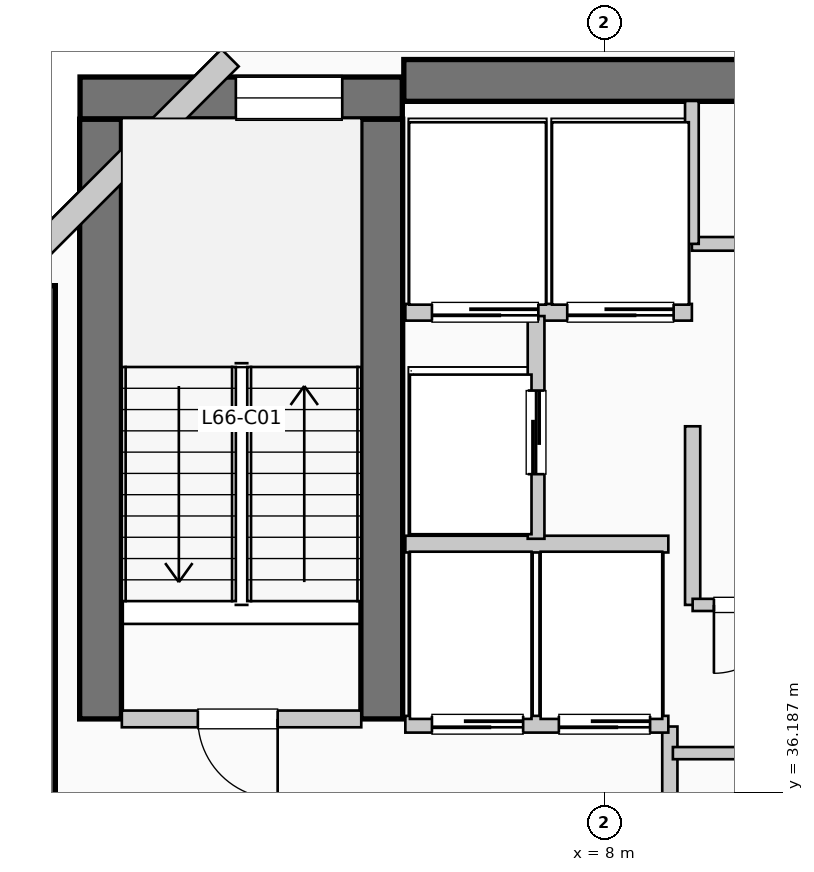
"""IFC4 building model, lengths in metres.
Left out: names, types, materials, properties, quantities, classifications, styles, units other than length and angle.
Written with IfcOpenShell. Run it as: python <this file> out.ifc"""

import sys

from ifc_helpers import new_model, si_unit, direction, frame, frame_2d, origin, place, context, subcontext, project, spatial, rectangle, extrude, element, fill, save


model = new_model("IFC4")
c1 = context("Model", 3, precision=1e-05, world=origin(), true_north=direction((0.0, 1.0)))
c2 = subcontext(c1, "Body", "Model", "MODEL_VIEW")
j1 = project(units=[si_unit("LENGTHUNIT", "METRE"), si_unit("PLANEANGLEUNIT", "RADIAN")], contexts=[c1])
p1 = place(None, origin())
s1 = spatial("IfcSite", under=j1, at=p1, CompositionType="ELEMENT")
p2 = place(p1, origin())
s2 = spatial("IfcBuilding", under=s1, at=p2, CompositionType="ELEMENT")
p3 = place(p2, frame((0.0, 0.0, 272.25)))
s3 = spatial("IfcBuildingStorey", under=s2, at=p3, CompositionType="ELEMENT", Elevation=272.25)
p4 = place(p3, frame((5.36, 45.55, 0.0), z_axis=(0.0, 0.0, 1.0), x_axis=(1.0, 0.0, 0.0)))
e1 = element("IfcWall", 1, at=p4, inside=s3, PredefinedType="SHEAR", context=c2, shape_type="SweptSolid", body=[
    extrude(rectangle(XDim=13.98, YDim=0.55, at=frame_2d((6.99, 0.0))), origin(), (0.0, 0.0, 1.0), 3.96),
])
p5 = place(p3, frame((0.5, 34.95, 0.0), z_axis=(0.0, 0.0, 1.0), x_axis=(0.0, 1.0, 0.0)))
e2 = element("IfcWall", 2, at=p5, inside=s3, PredefinedType="SHEAR", context=c2, shape_type="SweptSolid", body=[
    extrude(rectangle(XDim=7.9, YDim=0.55, at=frame_2d((3.95, 0.0))), origin(), (0.0, 0.0, 1.0), 3.96),
])
for number, where, z_axis, x_axis in (
    (3, (1.37, 37.15, 0.0), (0.0, 0.0, 1.0), (0.0, 1.0, 0.0)),
    (4, (5.07, 37.15, 0.0), (0.0, 0.0, 1.0), (0.0, 1.0, 0.0)),
):
    element("IfcWall", number, at=place(p3, frame(where, z_axis=z_axis, x_axis=x_axis)), inside=s3, PredefinedType="SHEAR", context=c2, shape_type="SweptSolid", body=[
        extrude(rectangle(XDim=7.89, YDim=0.55, at=frame_2d((3.945, 0.0))), origin(), (0.0, 0.0, 1.0), 3.96),
    ])
p6 = place(p3, frame((1.1, 45.32, 0.0), z_axis=(0.0, 0.0, 1.0), x_axis=(1.0, 0.0, 0.0)))
e5 = element("IfcWall", 5, at=p6, inside=s3, PredefinedType="SHEAR", context=c2, shape_type="SweptSolid", body=[
    extrude(rectangle(XDim=4.24, YDim=0.55, at=frame_2d((2.12, 0.0))), origin(), (0.0, 0.0, 1.0), 3.96),
])
p7 = place(p6, frame((2.05, 0.0, 1.05)))
e6 = element("IfcOpeningElement", 6, at=p7, cuts=e5, PredefinedType="OPENING", context=c2, shape_type="SweptSolid", body=[
    extrude(rectangle(XDim=1.4, YDim=1.8, at=frame_2d((0.7, 0.9))), frame((0.0, 0.285, 0.0), z_axis=(0.0, -1.0, 0.0), x_axis=(1.0, 0.0, 0.0)), (0.0, 0.0, 1.0), 0.57),
])
p8 = place(p3, frame((3.074, 45.848, 0.0), z_axis=(0.0, 0.0, 1.0), x_axis=(-0.707106781187, -0.707106781187, 0.0)))
e7 = element("IfcWall", 7, at=p8, inside=s3, PredefinedType="SOLIDWALL", context=c2, shape_type="SweptSolid", body=[
    extrude(rectangle(XDim=4.133, YDim=0.32, at=frame_2d((2.066, 0.0))), origin(), (0.0, 0.0, 1.0), 3.74),
])
p9 = place(p3, frame((1.65, 37.15, 0.0), z_axis=(0.0, 0.0, 1.0), x_axis=(1.0, 0.0, 0.0)))
e8 = element("IfcWall", 8, at=p9, inside=s3, PredefinedType="PARTITIONING", context=c2, shape_type="SweptSolid", body=[
    extrude(rectangle(XDim=3.15, YDim=0.22, at=frame_2d((1.575, 0.0))), origin(), (0.0, 0.0, 1.0), 3.74),
])
p10 = place(p9, frame((2.05, 0.0, 0.0), z_axis=(0.0, 0.0, 1.0), x_axis=(-1.0, 0.0, 0.0)))
e9 = element("IfcOpeningElement", 9, at=p10, cuts=e8, PredefinedType="OPENING", context=c2, shape_type="SweptSolid", body=[
    extrude(rectangle(XDim=1.05, YDim=2.15, at=frame_2d((0.525, 1.075))), frame((0.0, 0.12, 0.0), z_axis=(0.0, -1.0, 0.0), x_axis=(1.0, 0.0, 0.0)), (0.0, 0.0, 1.0), 0.24),
])
p11 = place(p3, frame((8.86, 34.55, 0.0), z_axis=(0.0, 0.0, 1.0), x_axis=(0.0, 1.0, 0.0)))
e10 = element("IfcWall", 10, at=p11, inside=s3, PredefinedType="PARTITIONING", context=c2, shape_type="SweptSolid", body=[
    extrude(rectangle(XDim=2.5, YDim=0.2, at=frame_2d((1.25, 0.0))), origin(), (0.0, 0.0, 1.0), 3.74),
])
p12 = place(p3, frame((5.38, 37.08, 0.0), z_axis=(0.0, 0.0, 1.0), x_axis=(1.0, 0.0, 0.0)))
e11 = element("IfcWall", 11, at=p12, inside=s3, PredefinedType="PARTITIONING", context=c2, shape_type="SweptSolid", body=[
    extrude(rectangle(XDim=3.46, YDim=0.22, at=frame_2d((1.73, 0.0))), origin(), (0.0, 0.0, 1.0), 3.74),
])
p13 = place(p12, frame((1.55, 0.0, 0.0), z_axis=(0.0, 0.0, 1.0), x_axis=(-1.0, 0.0, 0.0)))
e12 = element("IfcOpeningElement", 12, at=p13, cuts=e11, PredefinedType="OPENING", context=c2, shape_type="SweptSolid", body=[
    extrude(rectangle(XDim=1.2, YDim=2.2, at=frame_2d((0.6, 1.1))), frame((0.0, 0.12, 0.0), z_axis=(0.0, -1.0, 0.0), x_axis=(1.0, 0.0, 0.0)), (0.0, 0.0, 1.0), 0.24),
])
p14 = place(p12, frame((3.22, 0.0, 0.0), z_axis=(0.0, 0.0, 1.0), x_axis=(-1.0, 0.0, 0.0)))
e13 = element("IfcOpeningElement", 13, at=p14, cuts=e11, PredefinedType="OPENING", context=c2, shape_type="SweptSolid", body=[
    extrude(rectangle(XDim=1.2, YDim=2.2, at=frame_2d((0.6, 1.1))), frame((0.0, 0.12, 0.0), z_axis=(0.0, -1.0, 0.0), x_axis=(1.0, 0.0, 0.0)), (0.0, 0.0, 1.0), 0.24),
])
p15 = place(p3, frame((5.38, 39.45, 0.0), z_axis=(0.0, 0.0, 1.0), x_axis=(1.0, 0.0, 0.0)))
e14 = element("IfcWall", 14, at=p15, inside=s3, PredefinedType="PARTITIONING", context=c2, shape_type="SweptSolid", body=[
    extrude(rectangle(XDim=3.46, YDim=0.22, at=frame_2d((1.73, 0.0))), origin(), (0.0, 0.0, 1.0), 3.74),
])
p16 = place(p3, frame((5.38, 42.5, 0.0), z_axis=(0.0, 0.0, 1.0), x_axis=(1.0, 0.0, 0.0)))
e15 = element("IfcWall", 15, at=p16, inside=s3, PredefinedType="PARTITIONING", context=c2, shape_type="SweptSolid", body=[
    extrude(rectangle(XDim=3.77, YDim=0.22, at=frame_2d((1.885, 0.0))), origin(), (0.0, 0.0, 1.0), 3.74),
])
p17 = place(p16, frame((1.75, 0.0, 0.0), z_axis=(0.0, 0.0, 1.0), x_axis=(-1.0, 0.0, 0.0)))
e16 = element("IfcOpeningElement", 16, at=p17, cuts=e15, PredefinedType="OPENING", context=c2, shape_type="SweptSolid", body=[
    extrude(rectangle(XDim=1.4, YDim=2.2, at=frame_2d((0.7, 1.1))), frame((0.0, 0.12, 0.0), z_axis=(0.0, -1.0, 0.0), x_axis=(1.0, 0.0, 0.0)), (0.0, 0.0, 1.0), 0.24),
])
p18 = place(p16, frame((3.53, 0.0, 0.0), z_axis=(0.0, 0.0, 1.0), x_axis=(-1.0, 0.0, 0.0)))
e17 = element("IfcOpeningElement", 17, at=p18, cuts=e15, PredefinedType="OPENING", context=c2, shape_type="SweptSolid", body=[
    extrude(rectangle(XDim=1.4, YDim=2.2, at=frame_2d((0.7, 1.1))), frame((0.0, 0.12, 0.0), z_axis=(0.0, -1.0, 0.0), x_axis=(1.0, 0.0, 0.0)), (0.0, 0.0, 1.0), 0.24),
])
p19 = place(p3, frame((7.1, 39.52, 0.0), z_axis=(0.0, 0.0, 1.0), x_axis=(0.0, 1.0, 0.0)))
e18 = element("IfcWall", 18, at=p19, inside=s3, PredefinedType="PARTITIONING", context=c2, shape_type="SweptSolid", body=[
    extrude(rectangle(XDim=2.93, YDim=0.22, at=frame_2d((1.465, 0.0))), origin(), (0.0, 0.0, 1.0), 3.74),
])
p20 = place(p19, frame((0.85, 0.0, 0.0)))
e19 = element("IfcOpeningElement", 19, at=p20, cuts=e18, PredefinedType="OPENING", context=c2, shape_type="SweptSolid", body=[
    extrude(rectangle(XDim=1.1, YDim=2.2, at=frame_2d((0.55, 1.1))), frame((0.0, 0.12, 0.0), z_axis=(0.0, -1.0, 0.0), x_axis=(1.0, 0.0, 0.0)), (0.0, 0.0, 1.0), 0.24),
])
p21 = place(p3, frame((9.16, 38.65, 0.0), z_axis=(0.0, 0.0, 1.0), x_axis=(0.0, 1.0, 0.0)))
e20 = element("IfcWall", 20, at=p21, inside=s3, PredefinedType="PARTITIONING", context=c2, shape_type="SweptSolid", body=[
    extrude(rectangle(XDim=2.35, YDim=0.2, at=frame_2d((1.175, 0.0))), origin(), (0.0, 0.0, 1.0), 3.74),
])
p22 = place(p3, frame((8.9, 36.7, 0.0), z_axis=(0.0, 0.0, 1.0), x_axis=(1.0, 0.0, 0.0)))
e21 = element("IfcWall", 21, at=p22, inside=s3, PredefinedType="PARTITIONING", context=c2, shape_type="SweptSolid", body=[
    extrude(rectangle(XDim=3.25, YDim=0.16, at=frame_2d((1.625, 0.0))), origin(), (0.0, 0.0, 1.0), 3.74),
])
p23 = place(p22, frame((1.1, 0.0, 0.0)))
e22 = element("IfcOpeningElement", 22, at=p23, cuts=e21, PredefinedType="OPENING", context=c2, shape_type="SweptSolid", body=[
    extrude(rectangle(XDim=0.95, YDim=2.15, at=frame_2d((0.475, 1.075))), frame((0.0, 0.09, 0.0), z_axis=(0.0, -1.0, 0.0), x_axis=(1.0, 0.0, 0.0)), (0.0, 0.0, 1.0), 0.18),
])
p24 = place(p3, frame((9.16, 38.65, 0.0), z_axis=(0.0, 0.0, 1.0), x_axis=(1.0, 0.0, 0.0)))
e23 = element("IfcWall", 23, at=p24, inside=s3, PredefinedType="PARTITIONING", context=c2, shape_type="SweptSolid", body=[
    extrude(rectangle(XDim=3.42, YDim=0.16, at=frame_2d((1.71, 0.0))), origin(), (0.0, 0.0, 1.0), 3.74),
])
p25 = place(p24, frame((1.18, 0.0, 0.0), z_axis=(0.0, 0.0, 1.0), x_axis=(-1.0, 0.0, 0.0)))
e24 = element("IfcOpeningElement", 24, at=p25, cuts=e23, PredefinedType="OPENING", context=c2, shape_type="SweptSolid", body=[
    extrude(rectangle(XDim=0.9, YDim=2.15, at=frame_2d((0.45, 1.075))), frame((0.0, 0.09, 0.0), z_axis=(0.0, -1.0, 0.0), x_axis=(1.0, 0.0, 0.0)), (0.0, 0.0, 1.0), 0.18),
])
p26 = place(p24, frame((2.6, 0.0, 0.0), z_axis=(0.0, 0.0, 1.0), x_axis=(-1.0, 0.0, 0.0)))
e25 = element("IfcOpeningElement", 25, at=p26, cuts=e23, PredefinedType="OPENING", context=c2, shape_type="SweptSolid", body=[
    extrude(rectangle(XDim=0.9, YDim=2.15, at=frame_2d((0.45, 1.075))), frame((0.0, 0.09, 0.0), z_axis=(0.0, -1.0, 0.0), x_axis=(1.0, 0.0, 0.0)), (0.0, 0.0, 1.0), 0.18),
])
p27 = place(p3, frame((9.15, 43.4, 0.0), z_axis=(0.0, 0.0, 1.0), x_axis=(1.0, 0.0, 0.0)))
e26 = element("IfcWall", 26, at=p27, inside=s3, PredefinedType="PLUMBINGWALL", context=c2, shape_type="SweptSolid", body=[
    extrude(rectangle(XDim=9.33, YDim=0.18, at=frame_2d((4.665, 0.0))), origin(), (0.0, 0.0, 1.0), 3.74),
])
p28 = place(p27, frame((0.72, 0.0, 0.0)))
e27 = element("IfcOpeningElement", 27, at=p28, cuts=e26, PredefinedType="OPENING", context=c2, shape_type="SweptSolid", body=[
    extrude(rectangle(XDim=0.92, YDim=2.1, at=frame_2d((0.46, 1.05))), frame((0.0, 0.1, 0.0), z_axis=(0.0, -1.0, 0.0), x_axis=(1.0, 0.0, 0.0)), (0.0, 0.0, 1.0), 0.2),
])
p29 = place(p27, frame((3.02, 0.0, 0.0)))
e28 = element("IfcOpeningElement", 28, at=p29, cuts=e26, PredefinedType="OPENING", context=c2, shape_type="SweptSolid", body=[
    extrude(rectangle(XDim=0.92, YDim=2.1, at=frame_2d((0.46, 1.05))), frame((0.0, 0.1, 0.0), z_axis=(0.0, -1.0, 0.0), x_axis=(1.0, 0.0, 0.0)), (0.0, 0.0, 1.0), 0.2),
])
p30 = place(p27, frame((5.34, 0.0, 0.0)))
e29 = element("IfcOpeningElement", 29, at=p30, cuts=e26, PredefinedType="OPENING", context=c2, shape_type="SweptSolid", body=[
    extrude(rectangle(XDim=0.92, YDim=2.1, at=frame_2d((0.46, 1.05))), frame((0.0, 0.1, 0.0), z_axis=(0.0, -1.0, 0.0), x_axis=(1.0, 0.0, 0.0)), (0.0, 0.0, 1.0), 0.2),
])
p31 = place(p27, frame((7.66, 0.0, 0.0)))
e30 = element("IfcOpeningElement", 30, at=p31, cuts=e26, PredefinedType="OPENING", context=c2, shape_type="SweptSolid", body=[
    extrude(rectangle(XDim=0.95, YDim=2.1, at=frame_2d((0.475, 1.05))), frame((0.0, 0.1, 0.0), z_axis=(0.0, -1.0, 0.0), x_axis=(1.0, 0.0, 0.0)), (0.0, 0.0, 1.0), 0.2),
])
p32 = place(p3, frame((9.15, 43.4, 0.0), z_axis=(0.0, 0.0, 1.0), x_axis=(0.0, 1.0, 0.0)))
e31 = element("IfcWall", 31, at=p32, inside=s3, PredefinedType="PLUMBINGWALL", context=c2, shape_type="SweptSolid", body=[
    extrude(rectangle(XDim=1.88, YDim=0.18, at=frame_2d((0.94, 0.0))), origin(), (0.0, 0.0, 1.0), 3.74),
])
p33 = place(p7, origin())
e32 = element("IfcWindow", 32, at=p33, inside=s3, PartitioningType="SINGLE_PANEL", PredefinedType="WINDOW", context=c2, shape_type="SweptSolid", body=[
    extrude(rectangle(XDim=1.4, YDim=1.8, at=frame_2d((0.7, 0.9))), frame((0.0, 0.03, 0.0), z_axis=(0.0, -1.0, 0.0), x_axis=(1.0, 0.0, 0.0)), (0.0, 0.0, 1.0), 0.06),
])
fill(e6, e32)
p34 = place(p10, origin())
e33 = element("IfcDoor", 33, at=p34, inside=s3, OperationType="SINGLE_SWING_RIGHT", PredefinedType="DOOR", context=c2, shape_type="SweptSolid", body=[
    extrude(rectangle(XDim=1.05, YDim=2.15, at=frame_2d((0.525, 1.075))), frame((0.0, 0.025, 0.0), z_axis=(0.0, -1.0, 0.0), x_axis=(1.0, 0.0, 0.0)), (0.0, 0.0, 1.0), 0.05),
])
fill(e9, e33)
p35 = place(p13, origin())
e34 = element("IfcDoor", 34, at=p35, inside=s3, OperationType="SLIDING_TO_RIGHT", PredefinedType="DOOR", context=c2, shape_type="SweptSolid", body=[
    extrude(rectangle(XDim=1.2, YDim=2.2, at=frame_2d((0.6, 1.1))), frame((0.0, 0.025, 0.0), z_axis=(0.0, -1.0, 0.0), x_axis=(1.0, 0.0, 0.0)), (0.0, 0.0, 1.0), 0.05),
])
fill(e12, e34)
p36 = place(p14, origin())
e35 = element("IfcDoor", 35, at=p36, inside=s3, OperationType="SLIDING_TO_RIGHT", PredefinedType="DOOR", context=c2, shape_type="SweptSolid", body=[
    extrude(rectangle(XDim=1.2, YDim=2.2, at=frame_2d((0.6, 1.1))), frame((0.0, 0.025, 0.0), z_axis=(0.0, -1.0, 0.0), x_axis=(1.0, 0.0, 0.0)), (0.0, 0.0, 1.0), 0.05),
])
fill(e13, e35)
p37 = place(p17, origin())
e36 = element("IfcDoor", 36, at=p37, inside=s3, OperationType="SLIDING_TO_LEFT", PredefinedType="DOOR", context=c2, shape_type="SweptSolid", body=[
    extrude(rectangle(XDim=1.4, YDim=2.2, at=frame_2d((0.7, 1.1))), frame((0.0, 0.025, 0.0), z_axis=(0.0, -1.0, 0.0), x_axis=(1.0, 0.0, 0.0)), (0.0, 0.0, 1.0), 0.05),
])
fill(e16, e36)
p38 = place(p18, origin())
e37 = element("IfcDoor", 37, at=p38, inside=s3, OperationType="SLIDING_TO_LEFT", PredefinedType="DOOR", context=c2, shape_type="SweptSolid", body=[
    extrude(rectangle(XDim=1.4, YDim=2.2, at=frame_2d((0.7, 1.1))), frame((0.0, 0.025, 0.0), z_axis=(0.0, -1.0, 0.0), x_axis=(1.0, 0.0, 0.0)), (0.0, 0.0, 1.0), 0.05),
])
fill(e17, e37)
p39 = place(p20, origin())
e38 = element("IfcDoor", 38, at=p39, inside=s3, OperationType="SLIDING_TO_LEFT", PredefinedType="DOOR", context=c2, shape_type="SweptSolid", body=[
    extrude(rectangle(XDim=1.1, YDim=2.2, at=frame_2d((0.55, 1.1))), frame((0.0, 0.025, 0.0), z_axis=(0.0, -1.0, 0.0), x_axis=(1.0, 0.0, 0.0)), (0.0, 0.0, 1.0), 0.05),
])
fill(e19, e38)
p40 = place(p25, origin())
e39 = element("IfcDoor", 39, at=p40, inside=s3, OperationType="SINGLE_SWING_LEFT", PredefinedType="DOOR", context=c2, shape_type="SweptSolid", body=[
    extrude(rectangle(XDim=0.9, YDim=2.15, at=frame_2d((0.45, 1.075))), frame((0.0, 0.025, 0.0), z_axis=(0.0, -1.0, 0.0), x_axis=(1.0, 0.0, 0.0)), (0.0, 0.0, 1.0), 0.05),
])
fill(e24, e39)
save(model, sys.argv[1])
